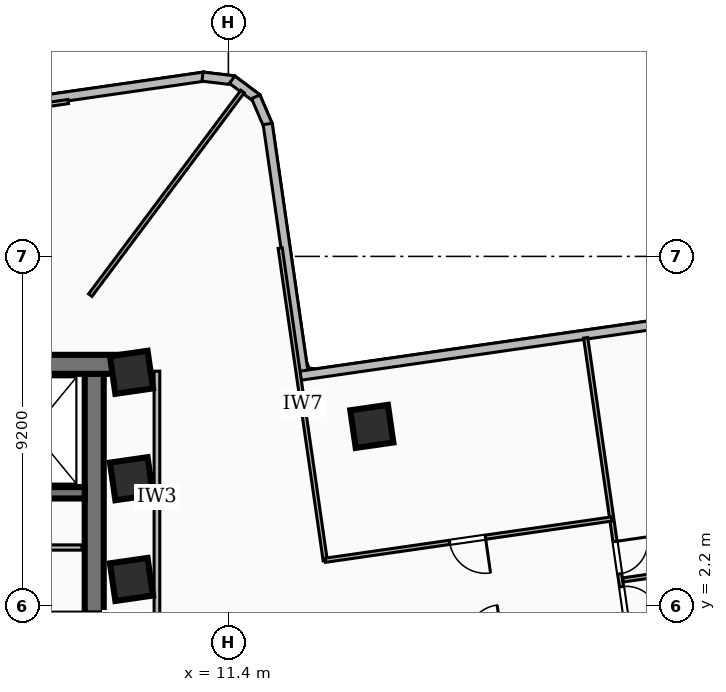
"""IFC4 building model, lengths in metres.
Left out: names, types, materials, properties, quantities, classifications, styles, units other than length and angle.
Written with IfcOpenShell. Run it as: python <this file> out.ifc"""

import sys

from ifc_helpers import new_model, si_unit, direction, frame, frame_2d, origin, origin_2d, place, context, subcontext, project, spatial, rectangle, extrude, element, fill, save


model = new_model("IFC4")
c1 = context("Model", 3, precision=1e-05, world=origin(), true_north=direction((0.0, 1.0)))
c2 = subcontext(c1, "Body", "Model", "MODEL_VIEW")
j1 = project(units=[si_unit("LENGTHUNIT", "METRE"), si_unit("PLANEANGLEUNIT", "RADIAN")], contexts=[c1])
p1 = place(None, origin())
s1 = spatial("IfcSite", under=j1, at=p1, CompositionType="ELEMENT")
p2 = place(p1, origin())
s2 = spatial("IfcBuilding", under=s1, at=p2, CompositionType="ELEMENT")
p3 = place(p2, frame((0.0, 0.0, 89.28)))
s3 = spatial("IfcBuildingStorey", under=s2, at=p3, CompositionType="ELEMENT", Elevation=89.28)
p4 = place(p3, frame((-8.78, 8.56, 0.0), z_axis=(0.0, 0.0, 1.0), x_axis=(1.0, 0.0, 0.0)))
e1 = element("IfcWall", 1, at=p4, inside=s3, PredefinedType="SHEAR", context=c2, shape_type="SweptSolid", body=[
    extrude(rectangle(XDim=17.56, YDim=0.5, at=frame_2d((8.78, 0.0))), origin(), (0.0, 0.0, 1.0), 3.34),
])
p5 = place(p3, frame((7.87, 8.31, 0.0), z_axis=(0.0, 0.0, 1.0), x_axis=(0.0, -1.0, 0.0)))
e2 = element("IfcWall", 2, at=p5, inside=s3, PredefinedType="SHEAR", context=c2, shape_type="SweptSolid", body=[
    extrude(rectangle(XDim=6.31, YDim=0.5, at=frame_2d((3.155, 0.0))), origin(), (0.0, 0.0, 1.0), 3.34),
])
p6 = place(p3, frame((7.62, 5.18, 0.0), z_axis=(0.0, 0.0, 1.0), x_axis=(-1.0, 0.0, 0.0)))
e3 = element("IfcWall", 3, at=p6, inside=s3, PredefinedType="SOLIDWALL", context=c2, shape_type="SweptSolid", body=[
    extrude(rectangle(XDim=15.24, YDim=0.3, at=frame_2d((7.62, 0.0))), origin(), (0.0, 0.0, 1.0), 3.34),
])
p7 = place(p6, frame((5.77, 0.0, 0.0)))
e4 = element("IfcOpeningElement", 4, at=p7, cuts=e3, PredefinedType="OPENING", context=c2, shape_type="SweptSolid", body=[
    extrude(rectangle(XDim=1.1, YDim=2.15, at=frame_2d((0.55, 1.075))), frame((0.0, 0.16, 0.0), z_axis=(0.0, -1.0, 0.0), x_axis=(1.0, 0.0, 0.0)), (0.0, 0.0, 1.0), 0.32),
])
p8 = place(p6, frame((2.97, 0.0, 0.0)))
e5 = element("IfcOpeningElement", 5, at=p8, cuts=e3, PredefinedType="OPENING", context=c2, shape_type="SweptSolid", body=[
    extrude(rectangle(XDim=1.1, YDim=2.15, at=frame_2d((0.55, 1.075))), frame((0.0, 0.16, 0.0), z_axis=(0.0, -1.0, 0.0), x_axis=(1.0, 0.0, 0.0)), (0.0, 0.0, 1.0), 0.32),
])
p9 = place(p6, frame((7.97, 0.0, 0.0)))
e6 = element("IfcOpeningElement", 6, at=p9, cuts=e3, PredefinedType="OPENING", context=c2, shape_type="SweptSolid", body=[
    extrude(rectangle(XDim=1.0, YDim=2.1, at=frame_2d((0.5, 1.05))), frame((0.0, 0.16, 0.0), z_axis=(0.0, -1.0, 0.0), x_axis=(1.0, 0.0, 0.0)), (0.0, 0.0, 1.0), 0.32),
])
for number, where, z_axis, x_axis in (
    (7, (8.85, 2.9, 0.0), (0.0, 0.0, 1.0), (0.99, 0.143, 0.0)),
    (8, (8.85, 5.55, 0.0), (0.0, 0.0, 1.0), (0.99, 0.143, 0.0)),
    (9, (8.85, 8.35, 0.0), (0.0, 0.0, 1.0), (0.99, 0.143, 0.0)),
    (10, (15.175, 6.927, 0.0), (0.0, 0.0, 1.0), (0.99, 0.143, 0.0)),
):
    element("IfcColumn", number, at=place(p3, frame(where, z_axis=z_axis, x_axis=x_axis)), inside=s3, PredefinedType="COLUMN", context=c2, shape_type="SweptSolid", body=[
        extrude(rectangle(XDim=1.0, YDim=1.0, at=origin_2d()), origin(), (0.0, 0.0, 1.0), 3.6),
    ])
p10 = place(p3, frame((4.419, 15.215, 0.0), z_axis=(0.0, 0.0, 1.0), x_axis=(0.989755260243, 0.14277438433, 0.0)))
e11 = element("IfcWall", 11, at=p10, inside=s3, PredefinedType="SOLIDWALL", context=c2, shape_type="SweptSolid", body=[
    extrude(rectangle(XDim=6.416, YDim=0.24, at=frame_2d((3.208, 0.0))), origin(), (0.0, 0.0, 1.0), 2.486),
])
p11 = place(p3, frame((10.719, 16.13, 0.0), z_axis=(0.0, 0.0, 1.0), x_axis=(0.993031739051, -0.117847211411, 0.0)))
e12 = element("IfcWall", 12, at=p11, inside=s3, PredefinedType="SOLIDWALL", context=c2, shape_type="SweptSolid", body=[
    extrude(rectangle(XDim=0.831, YDim=0.24, at=frame_2d((0.416, 0.0))), origin(), (0.0, 0.0, 1.0), 3.34),
])
p12 = place(p3, frame((11.499, 16.05, 0.0), z_axis=(0.0, 0.0, 1.0), x_axis=(0.800072018724, -0.599903963027, 0.0)))
e13 = element("IfcWall", 13, at=p12, inside=s3, PredefinedType="SOLIDWALL", context=c2, shape_type="SweptSolid", body=[
    extrude(rectangle(XDim=0.813, YDim=0.24, at=frame_2d((0.407, 0.0))), origin(), (0.0, 0.0, 1.0), 3.34),
])
p13 = place(p3, frame((12.12, 15.6, 0.0), z_axis=(0.0, 0.0, 1.0), x_axis=(0.394735025731, -0.918795004047, 0.0)))
e14 = element("IfcWall", 14, at=p13, inside=s3, PredefinedType="SOLIDWALL", context=c2, shape_type="SweptSolid", body=[
    extrude(rectangle(XDim=0.831, YDim=0.24, at=frame_2d((0.415, 0.0))), origin(), (0.0, 0.0, 1.0), 3.34),
])
p14 = place(p3, frame((12.434, 14.885, 0.0), z_axis=(0.0, 0.0, 1.0), x_axis=(0.142692500085, -0.989767068769, 0.0)))
e15 = element("IfcWall", 15, at=p14, inside=s3, PredefinedType="SOLIDWALL", context=c2, shape_type="SweptSolid", body=[
    extrude(rectangle(XDim=6.775, YDim=0.24, at=frame_2d((3.388, 0.0))), origin(), (0.0, 0.0, 1.0), 2.644),
])
p15 = place(p3, frame((13.292, 8.26, 0.0), z_axis=(0.0, 0.0, 1.0), x_axis=(0.989770197797, 0.142670794326, 0.0)))
e16 = element("IfcWall", 16, at=p15, inside=s3, PredefinedType="SOLIDWALL", context=c2, shape_type="SweptSolid", body=[
    extrude(rectangle(XDim=16.275, YDim=0.24, at=frame_2d((8.138, 0.0))), origin(), (0.0, 0.0, 1.0), 2.644),
])
p16 = place(p3, frame((2.9, 3.74, 0.0), z_axis=(0.0, 0.0, 1.0), x_axis=(1.0, 0.0, 0.0)))
e17 = element("IfcWall", 17, at=p16, inside=s3, PredefinedType="PARTITIONING", context=c2, shape_type="SweptSolid", body=[
    extrude(rectangle(XDim=4.65, YDim=0.138, at=frame_2d((2.325, 0.0))), origin(), (0.0, 0.0, 1.0), 3.34),
])
p17 = place(p3, frame((9.52, 1.75, 0.0), z_axis=(0.0, 0.0, 1.0), x_axis=(0.0, 1.0, 0.0)))
e18 = element("IfcWall", 18, at=p17, inside=s3, PredefinedType="PARTITIONING", context=c2, shape_type="SweptSolid", body=[
    extrude(rectangle(XDim=6.63, YDim=0.15, at=frame_2d((3.315, 0.0))), origin(), (0.0, 0.0, 1.0), 2.486),
])
p18 = place(p3, frame((7.766, 10.38, 0.0), z_axis=(0.0, 0.0, 1.0), x_axis=(0.598966195252, 0.800774310867, 0.0)))
e19 = element("IfcWall", 19, at=p18, inside=s3, PredefinedType="PARTITIONING", context=c2, shape_type="SweptSolid", body=[
    extrude(rectangle(XDim=6.691, YDim=0.11, at=frame_2d((3.346, 0.0))), origin(), (0.0, 0.0, 1.0), 2.644),
])
p19 = place(p3, frame((13.949, 3.394, 0.0), z_axis=(0.0, 0.0, 1.0), x_axis=(-0.142725091033, 0.989762369657, 0.0)))
e20 = element("IfcWall", 20, at=p19, inside=s3, PredefinedType="PARTITIONING", context=c2, shape_type="SweptSolid", body=[
    extrude(rectangle(XDim=8.31, YDim=0.11, at=frame_2d((4.155, 0.0))), origin(), (0.0, 0.0, 1.0), 2.486),
])
p20 = place(p3, frame((21.489, 4.491, 0.0), z_axis=(0.0, 0.0, 1.0), x_axis=(-0.989774445133, -0.142641325577, 0.0)))
e21 = element("IfcWall", 21, at=p20, inside=s3, PredefinedType="PARTITIONING", context=c2, shape_type="SweptSolid", body=[
    extrude(rectangle(XDim=7.62, YDim=0.11, at=frame_2d((3.81, 0.0))), origin(), (0.0, 0.0, 1.0), 3.34),
])
p21 = place(p20, frame((3.36, 0.0, 0.0)))
e22 = element("IfcOpeningElement", 22, at=p21, cuts=e21, PredefinedType="OPENING", context=c2, shape_type="SweptSolid", body=[
    extrude(rectangle(XDim=0.95, YDim=2.08, at=frame_2d((0.475, 1.04))), frame((0.0, 0.065, 0.0), z_axis=(0.0, -1.0, 0.0), x_axis=(1.0, 0.0, 0.0)), (0.0, 0.0, 1.0), 0.13),
])
p22 = place(p3, frame((21.781, 2.886, 0.0), z_axis=(0.0, 0.0, 1.0), x_axis=(0.989773870341, 0.142645313942, 0.0)))
e23 = element("IfcWall", 23, at=p22, inside=s3, PredefinedType="PARTITIONING", context=c2, shape_type="SweptSolid", body=[
    extrude(rectangle(XDim=10.024, YDim=0.11, at=frame_2d((5.012, 0.0))), origin(), (0.0, 0.0, 1.0), 2.832),
])
p23 = place(p3, frame((20.802, 9.257, 0.0), z_axis=(0.0, 0.0, 1.0), x_axis=(0.142667743944, -0.98977063749, 0.0)))
e24 = element("IfcWall", 24, at=p23, inside=s3, PredefinedType="PARTITIONING", context=c2, shape_type="SweptSolid", body=[
    extrude(rectangle(XDim=12.75, YDim=0.11, at=frame_2d((6.375, 0.0))), origin(), (0.0, 0.0, 1.0), 2.486),
])
p24 = place(p23, frame((6.615, 0.0, 0.0)))
e25 = element("IfcOpeningElement", 25, at=p24, cuts=e24, PredefinedType="OPENING", context=c2, shape_type="SweptSolid", body=[
    extrude(rectangle(XDim=0.86, YDim=2.04, at=frame_2d((0.43, 1.02))), frame((0.0, 0.065, 0.0), z_axis=(0.0, -1.0, 0.0), x_axis=(1.0, 0.0, 0.0)), (0.0, 0.0, 1.0), 0.13),
])
p25 = place(p23, frame((5.415, 0.0, 0.0)))
e26 = element("IfcOpeningElement", 26, at=p25, cuts=e24, PredefinedType="OPENING", context=c2, shape_type="SweptSolid", body=[
    extrude(rectangle(XDim=0.86, YDim=2.04, at=frame_2d((0.43, 1.02))), frame((0.0, 0.065, 0.0), z_axis=(0.0, -1.0, 0.0), x_axis=(1.0, 0.0, 0.0)), (0.0, 0.0, 1.0), 0.13),
])
p26 = place(p3, frame((7.186, 15.474, 0.0), z_axis=(0.0, 0.0, 1.0), x_axis=(-0.989754461648, -0.142779920322, 0.0)))
e27 = element("IfcWall", 27, at=p26, inside=s3, PredefinedType="PARTITIONING", context=c2, shape_type="SweptSolid", body=[
    extrude(rectangle(XDim=7.949, YDim=0.11, at=frame_2d((3.975, 0.0))), origin(), (0.0, 0.0, 1.0), 2.486),
])
p27 = place(p21, origin())
e28 = element("IfcDoor", 28, at=p27, inside=s3, OperationType="SINGLE_SWING_LEFT", PredefinedType="DOOR", context=c2, shape_type="SweptSolid", body=[
    extrude(rectangle(XDim=0.95, YDim=2.08, at=frame_2d((0.475, 1.04))), frame((0.0, 0.025, 0.0), z_axis=(0.0, -1.0, 0.0), x_axis=(1.0, 0.0, 0.0)), (0.0, 0.0, 1.0), 0.05),
])
fill(e22, e28)
p28 = place(p24, origin())
e29 = element("IfcDoor", 29, at=p28, inside=s3, OperationType="SINGLE_SWING_RIGHT", PredefinedType="DOOR", context=c2, shape_type="SweptSolid", body=[
    extrude(rectangle(XDim=0.86, YDim=2.04, at=frame_2d((0.43, 1.02))), frame((0.0, 0.025, 0.0), z_axis=(0.0, -1.0, 0.0), x_axis=(1.0, 0.0, 0.0)), (0.0, 0.0, 1.0), 0.05),
])
fill(e25, e29)
p29 = place(p25, origin())
e30 = element("IfcDoor", 30, at=p29, inside=s3, OperationType="SINGLE_SWING_LEFT", PredefinedType="DOOR", context=c2, shape_type="SweptSolid", body=[
    extrude(rectangle(XDim=0.86, YDim=2.04, at=frame_2d((0.43, 1.02))), frame((0.0, 0.025, 0.0), z_axis=(0.0, -1.0, 0.0), x_axis=(1.0, 0.0, 0.0)), (0.0, 0.0, 1.0), 0.05),
])
fill(e26, e30)
save(model, sys.argv[1])
